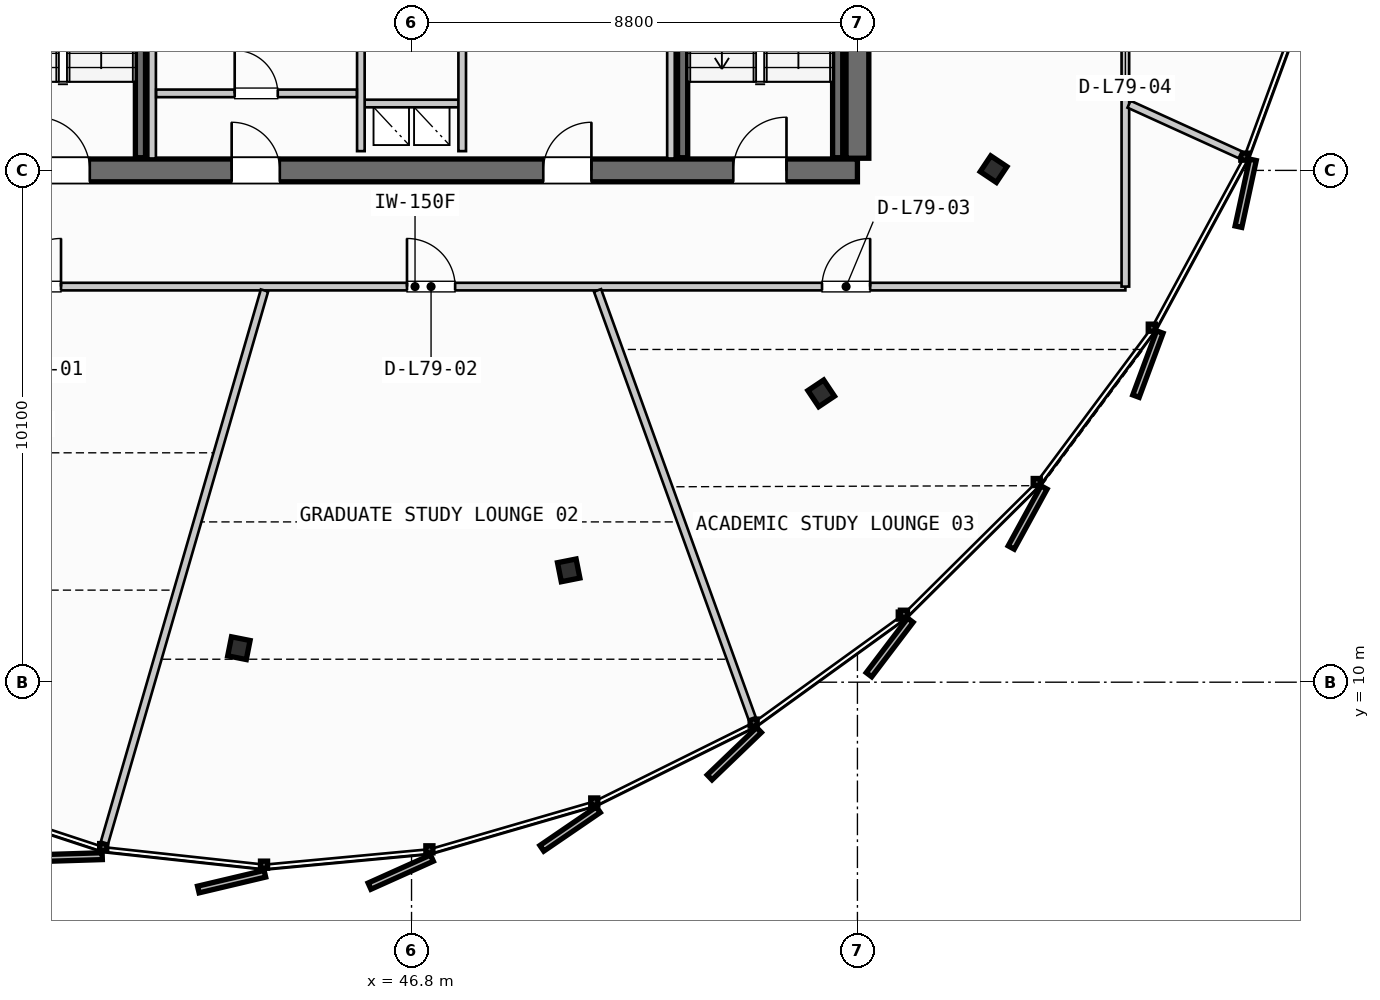
"""IFC4 building model, lengths in metres.
Left out: names, types, materials, properties, quantities, classifications, styles, units other than length and angle.
Written with IfcOpenShell. Run it as: python <this file> out.ifc"""

import sys

from ifc_helpers import new_model, si_unit, direction, frame, frame_2d, origin, origin_2d, place, context, subcontext, project, spatial, rectangle, i_section, extrude, source, transform, mapped, element, fill, save


model = new_model("IFC4")
c1 = context("Model", 3, precision=1e-05, world=origin(), true_north=direction((0.0, 1.0)))
c2 = subcontext(c1, "Body", "Model", "MODEL_VIEW")
j1 = project(units=[si_unit("LENGTHUNIT", "METRE"), si_unit("PLANEANGLEUNIT", "RADIAN")], contexts=[c1])
p1 = place(None, origin())
s1 = spatial("IfcSite", under=j1, at=p1, CompositionType="ELEMENT")
p2 = place(p1, origin())
s2 = spatial("IfcBuilding", under=s1, at=p2, CompositionType="ELEMENT")
p3 = place(p2, frame((0.0, 0.0, 297.4)))
s3 = spatial("IfcBuildingStorey", under=s2, at=p3, CompositionType="ELEMENT", Elevation=297.4)
p4 = place(p3, frame((38.0, 20.1, 0.0), z_axis=(0.0, 0.0, 1.0), x_axis=(1.0, 0.0, 0.0)))
e1 = element("IfcWall", 1, at=p4, inside=s3, PredefinedType="SHEAR", context=c2, shape_type="SweptSolid", body=[
    extrude(rectangle(XDim=17.6, YDim=0.45, at=frame_2d((8.8, 0.0))), origin(), (0.0, 0.0, 1.0), 3.21),
])
p5 = place(p4, frame((1.4, 0.0, 0.0)))
e2 = element("IfcOpeningElement", 2, at=p5, cuts=e1, PredefinedType="OPENING", context=c2, shape_type="SweptSolid", body=[
    extrude(rectangle(XDim=1.05, YDim=2.15, at=frame_2d((0.525, 1.075))), frame((0.0, 0.235, 0.0), z_axis=(0.0, -1.0, 0.0), x_axis=(1.0, 0.0, 0.0)), (0.0, 0.0, 1.0), 0.47),
])
p6 = place(p4, frame((15.15, 0.0, 0.0)))
e3 = element("IfcOpeningElement", 3, at=p6, cuts=e1, PredefinedType="OPENING", context=c2, shape_type="SweptSolid", body=[
    extrude(rectangle(XDim=1.05, YDim=2.15, at=frame_2d((0.525, 1.075))), frame((0.0, 0.235, 0.0), z_axis=(0.0, -1.0, 0.0), x_axis=(1.0, 0.0, 0.0)), (0.0, 0.0, 1.0), 0.47),
])
p7 = place(p4, frame((5.25, 0.0, 0.0)))
e4 = element("IfcOpeningElement", 4, at=p7, cuts=e1, PredefinedType="OPENING", context=c2, shape_type="SweptSolid", body=[
    extrude(rectangle(XDim=0.95, YDim=2.15, at=frame_2d((0.475, 1.075))), frame((0.0, 0.235, 0.0), z_axis=(0.0, -1.0, 0.0), x_axis=(1.0, 0.0, 0.0)), (0.0, 0.0, 1.0), 0.47),
])
p8 = place(p4, frame((11.4, 0.0, 0.0)))
e5 = element("IfcOpeningElement", 5, at=p8, cuts=e1, PredefinedType="OPENING", context=c2, shape_type="SweptSolid", body=[
    extrude(rectangle(XDim=0.95, YDim=2.15, at=frame_2d((0.475, 1.075))), frame((0.0, 0.235, 0.0), z_axis=(0.0, -1.0, 0.0), x_axis=(1.0, 0.0, 0.0)), (0.0, 0.0, 1.0), 0.47),
])
p9 = place(p3, frame((55.6, 20.34, 0.0), z_axis=(0.0, 0.0, 1.0), x_axis=(0.0, 1.0, 0.0)))
e6 = element("IfcWall", 6, at=p9, inside=s3, PredefinedType="SHEAR", context=c2, shape_type="SweptSolid", body=[
    extrude(rectangle(XDim=14.92, YDim=0.45, at=frame_2d((7.46, 0.0))), origin(), (0.0, 0.0, 1.0), 3.21),
])
p10 = place(p9, frame((12.71, 0.0, 0.0)))
e7 = element("IfcOpeningElement", 7, at=p10, cuts=e6, PredefinedType="OPENING", context=c2, shape_type="SweptSolid", body=[
    extrude(rectangle(XDim=1.05, YDim=2.15, at=frame_2d((0.525, 1.075))), frame((0.0, 0.235, 0.0), z_axis=(0.0, -1.0, 0.0), x_axis=(1.0, 0.0, 0.0)), (0.0, 0.0, 1.0), 0.47),
])
p11 = place(p9, frame((8.61, 0.0, 0.0)))
e8 = element("IfcOpeningElement", 8, at=p11, cuts=e6, PredefinedType="OPENING", context=c2, shape_type="SweptSolid", body=[
    extrude(rectangle(XDim=1.1, YDim=2.2, at=frame_2d((0.55, 1.1))), frame((0.0, 0.235, 0.0), z_axis=(0.0, -1.0, 0.0), x_axis=(1.0, 0.0, 0.0)), (0.0, 0.0, 1.0), 0.47),
])
m1 = source(origin(), c2, "Body", "SweptSolid", [
    extrude(i_section(OverallWidth=0.374, OverallDepth=0.383, WebThickness=0.017, FlangeThickness=0.026, FilletRadius=0.015, at=origin_2d()), origin(), (0.0, 0.0, 1.0), 3.21),
])
for number, where, z_axis, x_axis in (
    (9, (43.393, 10.671, 0.0), (0.0, 0.0, 1.0), (-0.195, -0.981, 0.0)),
    (10, (49.902, 12.207, 0.0), (0.0, 0.0, 1.0), (0.195, -0.981, 0.0)),
    (11, (54.885, 15.7, 0.0), (0.0, 0.0, 1.0), (0.556, -0.831, 0.0)),
    (12, (58.287, 20.125, 0.0), (0.0, 0.0, 1.0), (0.831, -0.556, 0.0)),
):
    element("IfcColumn", number, at=place(p3, frame(where, z_axis=z_axis, x_axis=x_axis)), inside=s3, PredefinedType="COLUMN", context=c2, shape_type="MappedRepresentation", body=[
        mapped(m1, transform((0.0, 0.0, 0.0), scale=1.0)),
    ])
for number, where, z_axis, x_axis in (
    (13, (41.45, 27.7, 0.0), (0.0, 0.0, 1.0), (0.0, -1.0, 0.0)),
    (14, (55.21, 27.7, 0.0), (0.0, 0.0, 1.0), (0.0, -1.0, 0.0)),
    (15, (52.15, 20.35, 0.0), (0.0, 0.0, 1.0), (0.0, 1.0, 0.0)),
):
    element("IfcWall", number, at=place(p3, frame(where, z_axis=z_axis, x_axis=x_axis)), inside=s3, PredefinedType="SHEAR", context=c2, shape_type="SweptSolid", body=[
        extrude(rectangle(XDim=7.35, YDim=0.2, at=frame_2d((3.675, 0.0))), origin(), (0.0, 0.0, 1.0), 3.21),
    ])
p12 = place(p3, frame((45.8, 21.42, 0.0), z_axis=(0.0, 0.0, 1.0), x_axis=(1.0, 0.0, 0.0)))
e16 = element("IfcWall", 16, at=p12, inside=s3, PredefinedType="PARTITIONING", context=c2, shape_type="SweptSolid", body=[
    extrude(rectangle(XDim=2.0, YDim=0.15, at=frame_2d((1.0, 0.0))), origin(), (0.0, 0.0, 1.0), 2.28),
])
for number, where, z_axis, x_axis in (
    (17, (45.8, 20.48, 0.0), (0.0, 0.0, 1.0), (0.0, 1.0, 0.0)),
    (18, (47.8, 20.48, 0.0), (0.0, 0.0, 1.0), (0.0, 1.0, 0.0)),
):
    element("IfcWall", number, at=place(p3, frame(where, z_axis=z_axis, x_axis=x_axis)), inside=s3, PredefinedType="PARTITIONING", context=c2, shape_type="SweptSolid", body=[
        extrude(rectangle(XDim=2.24, YDim=0.15, at=frame_2d((1.12, 0.0))), origin(), (0.0, 0.0, 1.0), 2.28),
    ])
for number, where, z_axis, x_axis in (
    (19, (41.68, 20.335, 0.0), (0.0, 0.0, 1.0), (0.0, 1.0, 0.0)),
    (20, (51.92, 20.335, 0.0), (0.0, 0.0, 1.0), (0.0, 1.0, 0.0)),
):
    element("IfcWall", number, at=place(p3, frame(where, z_axis=z_axis, x_axis=x_axis)), inside=s3, PredefinedType="PARTITIONING", context=c2, shape_type="SweptSolid", body=[
        extrude(rectangle(XDim=2.395, YDim=0.15, at=frame_2d((1.198, 0.0))), origin(), (0.0, 0.0, 1.0), 2.28),
    ])
p13 = place(p3, frame((41.76, 21.62, 0.0), z_axis=(0.0, 0.0, 1.0), x_axis=(1.0, 0.0, 0.0)))
e21 = element("IfcWall", 21, at=p13, inside=s3, PredefinedType="PARTITIONING", context=c2, shape_type="SweptSolid", body=[
    extrude(rectangle(XDim=3.96, YDim=0.15, at=frame_2d((1.98, 0.0))), origin(), (0.0, 0.0, 1.0), 2.28),
])
p14 = place(p13, frame((1.55, 0.0, 0.0)))
e22 = element("IfcOpeningElement", 22, at=p14, cuts=e21, PredefinedType="OPENING", context=c2, shape_type="SweptSolid", body=[
    extrude(rectangle(XDim=0.85, YDim=2.15, at=frame_2d((0.425, 1.075))), frame((0.0, 0.085, 0.0), z_axis=(0.0, -1.0, 0.0), x_axis=(1.0, 0.0, 0.0)), (0.0, 0.0, 1.0), 0.17),
])
p15 = place(p3, frame((32.85, 17.807, 0.0), z_axis=(0.0, 0.0, 1.0), x_axis=(1.0, 0.0, 0.0)))
e23 = element("IfcWall", 23, at=p15, inside=s3, PredefinedType="PARTITIONING", context=c2, shape_type="SweptSolid", body=[
    extrude(rectangle(XDim=28.038, YDim=0.15, at=frame_2d((14.019, 0.0))), origin(), (0.0, 0.0, 1.0), 2.28),
])
p16 = place(p15, frame((6.082, 0.0, 0.0)))
e24 = element("IfcOpeningElement", 24, at=p16, cuts=e23, PredefinedType="OPENING", context=c2, shape_type="SweptSolid", body=[
    extrude(rectangle(XDim=0.95, YDim=2.15, at=frame_2d((0.475, 1.075))), frame((0.0, 0.085, 0.0), z_axis=(0.0, -1.0, 0.0), x_axis=(1.0, 0.0, 0.0)), (0.0, 0.0, 1.0), 0.17),
])
p17 = place(p15, frame((13.86, 0.0, 0.0)))
e25 = element("IfcOpeningElement", 25, at=p17, cuts=e23, PredefinedType="OPENING", context=c2, shape_type="SweptSolid", body=[
    extrude(rectangle(XDim=0.95, YDim=2.15, at=frame_2d((0.475, 1.075))), frame((0.0, 0.085, 0.0), z_axis=(0.0, -1.0, 0.0), x_axis=(1.0, 0.0, 0.0)), (0.0, 0.0, 1.0), 0.17),
])
p18 = place(p15, frame((22.051, 0.0, 0.0)))
e26 = element("IfcOpeningElement", 26, at=p18, cuts=e23, PredefinedType="OPENING", context=c2, shape_type="SweptSolid", body=[
    extrude(rectangle(XDim=0.95, YDim=2.15, at=frame_2d((0.475, 1.075))), frame((0.0, 0.085, 0.0), z_axis=(0.0, -1.0, 0.0), x_axis=(1.0, 0.0, 0.0)), (0.0, 0.0, 1.0), 0.17),
])
p19 = place(p3, frame((60.888, 17.807, 0.0), z_axis=(0.0, 0.0, 1.0), x_axis=(0.0, 1.0, 0.0)))
e27 = element("IfcWall", 27, at=p19, inside=s3, PredefinedType="PARTITIONING", context=c2, shape_type="SweptSolid", body=[
    extrude(rectangle(XDim=19.524, YDim=0.15, at=frame_2d((9.762, 0.0))), origin(), (0.0, 0.0, 1.0), 2.28),
])
p20 = place(p19, frame((5.089, 0.0, 0.0)))
e28 = element("IfcOpeningElement", 28, at=p20, cuts=e27, PredefinedType="OPENING", context=c2, shape_type="SweptSolid", body=[
    extrude(rectangle(XDim=0.95, YDim=2.15, at=frame_2d((0.475, 1.075))), frame((0.0, 0.085, 0.0), z_axis=(0.0, -1.0, 0.0), x_axis=(1.0, 0.0, 0.0)), (0.0, 0.0, 1.0), 0.17),
])
p21 = place(p19, frame((14.359, 0.0, 0.0)))
e29 = element("IfcOpeningElement", 29, at=p21, cuts=e27, PredefinedType="OPENING", context=c2, shape_type="SweptSolid", body=[
    extrude(rectangle(XDim=0.95, YDim=2.15, at=frame_2d((0.475, 1.075))), frame((0.0, 0.085, 0.0), z_axis=(0.0, -1.0, 0.0), x_axis=(1.0, 0.0, 0.0)), (0.0, 0.0, 1.0), 0.17),
])
p22 = place(p3, frame((43.898, 17.73, 0.0), z_axis=(0.0, 0.0, 1.0), x_axis=(-0.278345417283, -0.960481040249, 0.0)))
e30 = element("IfcWall", 30, at=p22, inside=s3, PredefinedType="PARTITIONING", context=c2, shape_type="SweptSolid", body=[
    extrude(rectangle(XDim=11.346, YDim=0.15, at=frame_2d((5.673, 0.0))), origin(), (0.0, 0.0, 1.0), 2.28),
])
p23 = place(p3, frame((50.471, 17.732, 0.0), z_axis=(0.0, 0.0, 1.0), x_axis=(0.339777426645, -0.940505874698, 0.0)))
e31 = element("IfcWall", 31, at=p23, inside=s3, PredefinedType="PARTITIONING", context=c2, shape_type="SweptSolid", body=[
    extrude(rectangle(XDim=8.979, YDim=0.15, at=frame_2d((4.489, 0.0))), origin(), (0.0, 0.0, 1.0), 2.28),
])
p24 = place(p3, frame((60.961, 21.406, 0.0), z_axis=(0.0, 0.0, 1.0), x_axis=(0.910238051655, -0.414085364772, 0.0)))
e32 = element("IfcWall", 32, at=p24, inside=s3, PredefinedType="PARTITIONING", context=c2, shape_type="SweptSolid", body=[
    extrude(rectangle(XDim=2.41, YDim=0.15, at=frame_2d((1.205, 0.0))), origin(), (0.0, 0.0, 1.0), 2.28),
])
m2 = source(origin(), c2, "Body", "SweptSolid", [
    extrude(rectangle(XDim=1.05, YDim=2.15, at=frame_2d((0.525, 1.075))), frame((0.0, 0.025, 0.0), z_axis=(0.0, -1.0, 0.0), x_axis=(1.0, 0.0, 0.0)), (0.0, 0.0, 1.0), 0.05),
])
p25 = place(p5, origin())
e33 = element("IfcDoor", 33, at=p25, inside=s3, OperationType="SINGLE_SWING_LEFT", PredefinedType="DOOR", context=c2, shape_type="MappedRepresentation", body=[
    mapped(m2, transform((0.0, 0.0, 0.0), scale=1.0)),
])
fill(e2, e33)
p26 = place(p6, origin())
e34 = element("IfcDoor", 34, at=p26, inside=s3, OperationType="SINGLE_SWING_RIGHT", PredefinedType="DOOR", context=c2, shape_type="MappedRepresentation", body=[
    mapped(m2, transform((0.0, 0.0, 0.0), scale=1.0)),
])
fill(e3, e34)
m3 = source(origin(), c2, "Body", "SweptSolid", [
    extrude(rectangle(XDim=0.95, YDim=2.15, at=frame_2d((0.475, 1.075))), frame((0.0, 0.025, 0.0), z_axis=(0.0, -1.0, 0.0), x_axis=(1.0, 0.0, 0.0)), (0.0, 0.0, 1.0), 0.05),
])
p27 = place(p7, origin())
e35 = element("IfcDoor", 35, at=p27, inside=s3, OperationType="SINGLE_SWING_LEFT", PredefinedType="DOOR", context=c2, shape_type="MappedRepresentation", body=[
    mapped(m3, transform((0.0, 0.0, 0.0), scale=1.0)),
])
fill(e4, e35)
p28 = place(p8, origin())
e36 = element("IfcDoor", 36, at=p28, inside=s3, OperationType="SINGLE_SWING_RIGHT", PredefinedType="DOOR", context=c2, shape_type="MappedRepresentation", body=[
    mapped(m3, transform((0.0, 0.0, 0.0), scale=1.0)),
])
fill(e5, e36)
m4 = source(origin(), c2, "Body", "SweptSolid", [
    extrude(rectangle(XDim=0.85, YDim=2.15, at=frame_2d((0.425, 1.075))), frame((0.0, 0.025, 0.0), z_axis=(0.0, -1.0, 0.0), x_axis=(1.0, 0.0, 0.0)), (0.0, 0.0, 1.0), 0.05),
])
p29 = place(p14, origin())
e37 = element("IfcDoor", 37, at=p29, inside=s3, OperationType="SINGLE_SWING_LEFT", PredefinedType="DOOR", context=c2, shape_type="MappedRepresentation", body=[
    mapped(m4, transform((0.0, 0.0, 0.0), scale=1.0)),
])
fill(e22, e37)
p30 = place(p16, origin())
e38 = element("IfcDoor", 38, at=p30, inside=s3, OperationType="SINGLE_SWING_RIGHT", PredefinedType="DOOR", context=c2, shape_type="MappedRepresentation", body=[
    mapped(m3, transform((0.0, 0.0, 0.0), scale=1.0)),
])
fill(e24, e38)
p31 = place(p17, origin())
e39 = element("IfcDoor", 39, at=p31, inside=s3, OperationType="SINGLE_SWING_LEFT", PredefinedType="DOOR", context=c2, shape_type="MappedRepresentation", body=[
    mapped(m3, transform((0.0, 0.0, 0.0), scale=1.0)),
])
fill(e25, e39)
p32 = place(p18, origin())
e40 = element("IfcDoor", 40, at=p32, inside=s3, OperationType="SINGLE_SWING_RIGHT", PredefinedType="DOOR", context=c2, shape_type="MappedRepresentation", body=[
    mapped(m3, transform((0.0, 0.0, 0.0), scale=1.0)),
])
fill(e26, e40)
save(model, sys.argv[1])
